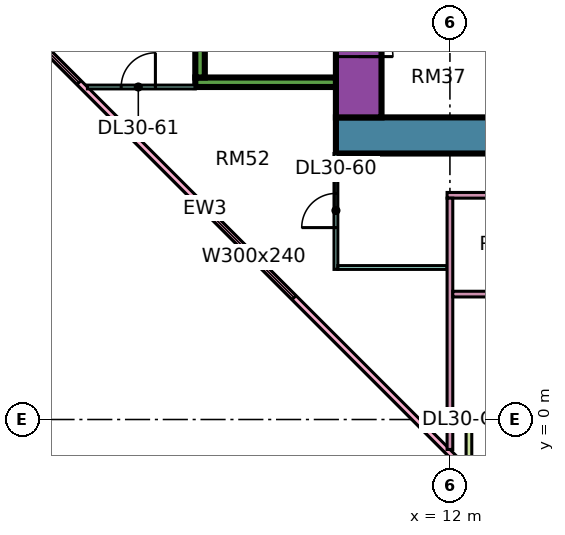
"""IFC4 building model, lengths in metres.
Left out: names, types, materials, properties, quantities, classifications, styles, units other than length and angle.
Written with IfcOpenShell. Run it as: python <this file> out.ifc"""

import sys

from ifc_helpers import new_model, si_unit, direction, frame, frame_2d, origin, place, context, subcontext, project, spatial, rectangle, extrude, element, fill, save


model = new_model("IFC4")
c1 = context("Model", 3, precision=1e-05, world=origin(), true_north=direction((0.0, 1.0)))
c2 = subcontext(c1, "Body", "Model", "MODEL_VIEW")
j1 = project(units=[si_unit("LENGTHUNIT", "METRE"), si_unit("PLANEANGLEUNIT", "RADIAN")], contexts=[c1])
p1 = place(None, origin())
s1 = spatial("IfcSite", under=j1, at=p1, CompositionType="ELEMENT")
p2 = place(p1, origin())
s2 = spatial("IfcBuilding", under=s1, at=p2, CompositionType="ELEMENT")
p3 = place(p2, frame((0.0, 0.0, 129.4)))
s3 = spatial("IfcBuildingStorey", under=s2, at=p3, CompositionType="ELEMENT", Elevation=129.4)
p4 = place(p3, frame((9.0, 7.475, 0.0), z_axis=(0.0, 0.0, 1.0), x_axis=(1.0, 0.0, 0.0)))
e1 = element("IfcWall", 1, at=p4, inside=s3, PredefinedType="SHEAR", context=c2, shape_type="SweptSolid", body=[
    extrude(rectangle(XDim=25.0, YDim=0.95, at=frame_2d((12.5, 0.0))), origin(), (0.0, 0.0, 1.0), 3.75),
])
p5 = place(p3, frame((9.6, 7.95, 0.0), z_axis=(0.0, 0.0, 1.0), x_axis=(0.0, 1.0, 0.0)))
e2 = element("IfcWall", 2, at=p5, inside=s3, PredefinedType="SHEAR", context=c2, shape_type="SweptSolid", body=[
    extrude(rectangle(XDim=11.1, YDim=1.2, at=frame_2d((5.55, 0.0))), origin(), (0.0, 0.0, 1.0), 3.75),
])
p6 = place(p5, frame((3.925, 0.0, 0.0)))
e3 = element("IfcOpeningElement", 3, at=p6, cuts=e2, PredefinedType="OPENING", context=c2, shape_type="SweptSolid", body=[
    extrude(rectangle(XDim=1.1, YDim=2.2, at=frame_2d((0.55, 1.1))), frame((0.0, 0.61, 0.0), z_axis=(0.0, -1.0, 0.0), x_axis=(1.0, 0.0, 0.0)), (0.0, 0.0, 1.0), 1.22),
])
p7 = place(p5, frame((6.425, 0.0, 0.0)))
e4 = element("IfcOpeningElement", 4, at=p7, cuts=e2, PredefinedType="OPENING", context=c2, shape_type="SweptSolid", body=[
    extrude(rectangle(XDim=1.1, YDim=2.2, at=frame_2d((0.55, 1.1))), frame((0.0, 0.61, 0.0), z_axis=(0.0, -1.0, 0.0), x_axis=(1.0, 0.0, 0.0)), (0.0, 0.0, 1.0), 1.22),
])
p8 = place(p5, frame((9.175, 0.0, 0.0)))
e5 = element("IfcOpeningElement", 5, at=p8, cuts=e2, PredefinedType="OPENING", context=c2, shape_type="SweptSolid", body=[
    extrude(rectangle(XDim=1.1, YDim=2.2, at=frame_2d((0.55, 1.1))), frame((0.0, 0.61, 0.0), z_axis=(0.0, -1.0, 0.0), x_axis=(1.0, 0.0, 0.0)), (0.0, 0.0, 1.0), 1.22),
])
p9 = place(p5, frame((1.6, 0.0, 0.0)))
e6 = element("IfcOpeningElement", 6, at=p9, cuts=e2, PredefinedType="OPENING", context=c2, shape_type="SweptSolid", body=[
    extrude(rectangle(XDim=0.9, YDim=2.1, at=frame_2d((0.45, 1.05))), frame((0.0, 0.61, 0.0), z_axis=(0.0, -1.0, 0.0), x_axis=(1.0, 0.0, 0.0)), (0.0, 0.0, 1.0), 1.22),
])
p10 = place(p3, frame((5.3, 8.875, 0.0), z_axis=(0.0, 0.0, 1.0), x_axis=(1.0, 0.0, 0.0)))
e7 = element("IfcWall", 7, at=p10, inside=s3, PredefinedType="SHEAR", context=c2, shape_type="SweptSolid", body=[
    extrude(rectangle(XDim=3.7, YDim=0.25, at=frame_2d((1.85, 0.0))), origin(), (0.0, 0.0, 1.0), 3.75),
])
p11 = place(p3, frame((5.425, 9.0, 0.0), z_axis=(0.0, 0.0, 1.0), x_axis=(0.0, 1.0, 0.0)))
e8 = element("IfcWall", 8, at=p11, inside=s3, PredefinedType="SHEAR", context=c2, shape_type="SweptSolid", body=[
    extrude(rectangle(XDim=4.0, YDim=0.25, at=frame_2d((2.0, 0.0))), origin(), (0.0, 0.0, 1.0), 3.75),
])
p12 = place(p3, frame((-1.447, 12.553, 0.0), z_axis=(0.0, 0.0, 1.0), x_axis=(0.707106781187, -0.707106781187, 0.0)))
e9 = element("IfcWall", 9, at=p12, inside=s3, PredefinedType="SOLIDWALL", context=c2, shape_type="SweptSolid", body=[
    extrude(rectangle(XDim=19.799, YDim=0.15, at=frame_2d((9.899, 0.0))), origin(), (0.0, 0.0, 1.0), 3.35),
])
p13 = place(p12, frame((2.212, 0.0, 0.45)))
e10 = element("IfcOpeningElement", 10, at=p13, cuts=e9, PredefinedType="OPENING", context=c2, shape_type="SweptSolid", body=[
    extrude(rectangle(XDim=3.0, YDim=2.4, at=frame_2d((1.5, 1.2))), frame((0.0, 0.085, 0.0), z_axis=(0.0, -1.0, 0.0), x_axis=(1.0, 0.0, 0.0)), (0.0, 0.0, 1.0), 0.17),
])
p14 = place(p12, frame((10.216, 0.0, 0.45)))
e11 = element("IfcOpeningElement", 11, at=p14, cuts=e9, PredefinedType="OPENING", context=c2, shape_type="SweptSolid", body=[
    extrude(rectangle(XDim=3.0, YDim=2.4, at=frame_2d((1.5, 1.2))), frame((0.0, 0.085, 0.0), z_axis=(0.0, -1.0, 0.0), x_axis=(1.0, 0.0, 0.0)), (0.0, 0.0, 1.0), 0.17),
])
p15 = place(p3, frame((12.575, 0.0, 0.0), z_axis=(0.0, 0.0, 1.0), x_axis=(1.0, 0.0, 0.0)))
e12 = element("IfcWall", 12, at=p15, inside=s3, PredefinedType="SOLIDWALL", context=c2, shape_type="SweptSolid", body=[
    extrude(rectangle(XDim=11.35, YDim=0.15, at=frame_2d((5.675, 0.0))), origin(), (0.0, 0.0, 1.0), 3.35),
])
p16 = place(p15, frame((1.812, 0.0, 0.0)))
e13 = element("IfcOpeningElement", 13, at=p16, cuts=e12, PredefinedType="OPENING", context=c2, shape_type="SweptSolid", body=[
    extrude(rectangle(XDim=1.8, YDim=2.4, at=frame_2d((0.9, 1.2))), frame((0.0, 0.085, 0.0), z_axis=(0.0, -1.0, 0.0), x_axis=(1.0, 0.0, 0.0)), (0.0, 0.0, 1.0), 0.17),
])
p17 = place(p15, frame((6.625, 0.0, 0.45)))
e14 = element("IfcOpeningElement", 14, at=p17, cuts=e12, PredefinedType="OPENING", context=c2, shape_type="SweptSolid", body=[
    extrude(rectangle(XDim=3.0, YDim=2.4, at=frame_2d((1.5, 1.2))), frame((0.0, 0.085, 0.0), z_axis=(0.0, -1.0, 0.0), x_axis=(1.0, 0.0, 0.0)), (0.0, 0.0, 1.0), 0.17),
])
p18 = place(p3, frame((12.5, -1.5, 0.0), z_axis=(0.0, 0.0, 1.0), x_axis=(0.0, 1.0, 0.0)))
e15 = element("IfcWall", 15, at=p18, inside=s3, PredefinedType="SOLIDWALL", context=c2, shape_type="SweptSolid", body=[
    extrude(rectangle(XDim=1.5, YDim=0.15, at=frame_2d((0.75, 0.0))), origin(), (0.0, 0.0, 1.0), 3.35),
])
p19 = place(p3, frame((2.461, 8.75, 0.0), z_axis=(0.0, 0.0, 1.0), x_axis=(1.0, 0.0, 0.0)))
e16 = element("IfcWall", 16, at=p19, inside=s3, PredefinedType="PARTITIONING", context=c2, shape_type="SweptSolid", body=[
    extrude(rectangle(XDim=2.839, YDim=0.1, at=frame_2d((1.419, 0.0))), origin(), (0.0, 0.0, 1.0), 3.35),
])
p20 = place(p19, frame((0.889, 0.0, 0.0)))
e17 = element("IfcOpeningElement", 17, at=p20, cuts=e16, PredefinedType="OPENING", context=c2, shape_type="SweptSolid", body=[
    extrude(rectangle(XDim=0.9, YDim=2.1, at=frame_2d((0.45, 1.05))), frame((0.0, 0.06, 0.0), z_axis=(0.0, -1.0, 0.0), x_axis=(1.0, 0.0, 0.0)), (0.0, 0.0, 1.0), 0.12),
])
p21 = place(p3, frame((9.0, 3.95, 0.0), z_axis=(0.0, 0.0, 1.0), x_axis=(0.0, 1.0, 0.0)))
e18 = element("IfcWall", 18, at=p21, inside=s3, PredefinedType="PARTITIONING", context=c2, shape_type="SweptSolid", body=[
    extrude(rectangle(XDim=3.05, YDim=0.1, at=frame_2d((1.525, 0.0))), origin(), (0.0, 0.0, 1.0), 3.35),
])
p22 = place(p21, frame((1.1, 0.0, 0.0)))
e19 = element("IfcOpeningElement", 19, at=p22, cuts=e18, PredefinedType="OPENING", context=c2, shape_type="SweptSolid", body=[
    extrude(rectangle(XDim=0.9, YDim=2.1, at=frame_2d((0.45, 1.05))), frame((0.0, 0.06, 0.0), z_axis=(0.0, -1.0, 0.0), x_axis=(1.0, 0.0, 0.0)), (0.0, 0.0, 1.0), 0.12),
])
p23 = place(p3, frame((9.05, 4.0, 0.0), z_axis=(0.0, 0.0, 1.0), x_axis=(1.0, 0.0, 0.0)))
e20 = element("IfcWall", 20, at=p23, inside=s3, PredefinedType="PARTITIONING", context=c2, shape_type="SweptSolid", body=[
    extrude(rectangle(XDim=2.875, YDim=0.1, at=frame_2d((1.438, 0.0))), origin(), (0.0, 0.0, 1.0), 3.35),
])
p24 = place(p3, frame((11.925, 5.9, 0.0), z_axis=(0.0, 0.0, 1.0), x_axis=(1.0, 0.0, 0.0)))
e21 = element("IfcWall", 21, at=p24, inside=s3, PredefinedType="PARTITIONING", context=c2, shape_type="SweptSolid", body=[
    extrude(rectangle(XDim=21.125, YDim=0.15, at=frame_2d((10.562, 0.0))), origin(), (0.0, 0.0, 1.0), 3.35),
])
p25 = place(p24, frame((16.125, 0.0, 0.0)))
e22 = element("IfcOpeningElement", 22, at=p25, cuts=e21, PredefinedType="OPENING", context=c2, shape_type="SweptSolid", body=[
    extrude(rectangle(XDim=0.9, YDim=2.1, at=frame_2d((0.45, 1.05))), frame((0.0, 0.085, 0.0), z_axis=(0.0, -1.0, 0.0), x_axis=(1.0, 0.0, 0.0)), (0.0, 0.0, 1.0), 0.17),
])
p26 = place(p24, frame((4.125, 0.0, 0.0)))
e23 = element("IfcOpeningElement", 23, at=p26, cuts=e21, PredefinedType="OPENING", context=c2, shape_type="SweptSolid", body=[
    extrude(rectangle(XDim=0.9, YDim=2.1, at=frame_2d((0.45, 1.05))), frame((0.0, 0.085, 0.0), z_axis=(0.0, -1.0, 0.0), x_axis=(1.0, 0.0, 0.0)), (0.0, 0.0, 1.0), 0.17),
])
p27 = place(p24, frame((10.125, 0.0, 0.0)))
e24 = element("IfcOpeningElement", 24, at=p27, cuts=e21, PredefinedType="OPENING", context=c2, shape_type="SweptSolid", body=[
    extrude(rectangle(XDim=0.9, YDim=2.1, at=frame_2d((0.45, 1.05))), frame((0.0, 0.085, 0.0), z_axis=(0.0, -1.0, 0.0), x_axis=(1.0, 0.0, 0.0)), (0.0, 0.0, 1.0), 0.17),
])
p28 = place(p3, frame((12.0, -0.788, 0.0), z_axis=(0.0, 0.0, 1.0), x_axis=(0.0, 1.0, 0.0)))
e25 = element("IfcWall", 25, at=p28, inside=s3, PredefinedType="PARTITIONING", context=c2, shape_type="SweptSolid", body=[
    extrude(rectangle(XDim=6.613, YDim=0.15, at=frame_2d((3.306, 0.0))), origin(), (0.0, 0.0, 1.0), 3.35),
])
p29 = place(p3, frame((12.075, 3.3, 0.0), z_axis=(0.0, 0.0, 1.0), x_axis=(1.0, 0.0, 0.0)))
e26 = element("IfcWall", 26, at=p29, inside=s3, PredefinedType="PARTITIONING", context=c2, shape_type="SweptSolid", body=[
    extrude(rectangle(XDim=3.0, YDim=0.15, at=frame_2d((1.5, 0.0))), origin(), (0.0, 0.0, 1.0), 3.35),
])
p30 = place(p13, origin())
e27 = element("IfcWindow", 27, at=p30, inside=s3, PartitioningType="SINGLE_PANEL", PredefinedType="WINDOW", context=c2, shape_type="SweptSolid", body=[
    extrude(rectangle(XDim=3.0, YDim=2.4, at=frame_2d((1.5, 1.2))), frame((0.0, 0.03, 0.0), z_axis=(0.0, -1.0, 0.0), x_axis=(1.0, 0.0, 0.0)), (0.0, 0.0, 1.0), 0.06),
])
fill(e10, e27)
p31 = place(p14, origin())
e28 = element("IfcWindow", 28, at=p31, inside=s3, PartitioningType="SINGLE_PANEL", PredefinedType="WINDOW", context=c2, shape_type="SweptSolid", body=[
    extrude(rectangle(XDim=3.0, YDim=2.4, at=frame_2d((1.5, 1.2))), frame((0.0, 0.03, 0.0), z_axis=(0.0, -1.0, 0.0), x_axis=(1.0, 0.0, 0.0)), (0.0, 0.0, 1.0), 0.06),
])
fill(e11, e28)
p32 = place(p9, frame((0.9, 0.0, 0.0), z_axis=(0.0, 0.0, 1.0), x_axis=(-1.0, 0.0, 0.0)))
e29 = element("IfcDoor", 29, at=p32, inside=s3, OperationType="SINGLE_SWING_LEFT", PredefinedType="DOOR", context=c2, shape_type="SweptSolid", body=[
    extrude(rectangle(XDim=0.9, YDim=2.1, at=frame_2d((0.45, 1.05))), frame((0.0, 0.025, 0.0), z_axis=(0.0, -1.0, 0.0), x_axis=(1.0, 0.0, 0.0)), (0.0, 0.0, 1.0), 0.05),
])
fill(e6, e29)
p33 = place(p22, origin())
e30 = element("IfcDoor", 30, at=p33, inside=s3, OperationType="SINGLE_SWING_LEFT", PredefinedType="DOOR", context=c2, shape_type="SweptSolid", body=[
    extrude(rectangle(XDim=0.9, YDim=2.1, at=frame_2d((0.45, 1.05))), frame((0.0, 0.025, 0.0), z_axis=(0.0, -1.0, 0.0), x_axis=(1.0, 0.0, 0.0)), (0.0, 0.0, 1.0), 0.05),
])
fill(e19, e30)
p34 = place(p20, frame((0.9, 0.0, 0.0), z_axis=(0.0, 0.0, 1.0), x_axis=(-1.0, 0.0, 0.0)))
e31 = element("IfcDoor", 31, at=p34, inside=s3, OperationType="SINGLE_SWING_RIGHT", PredefinedType="DOOR", context=c2, shape_type="SweptSolid", body=[
    extrude(rectangle(XDim=0.9, YDim=2.1, at=frame_2d((0.45, 1.05))), frame((0.0, 0.025, 0.0), z_axis=(0.0, -1.0, 0.0), x_axis=(1.0, 0.0, 0.0)), (0.0, 0.0, 1.0), 0.05),
])
fill(e17, e31)
save(model, sys.argv[1])
